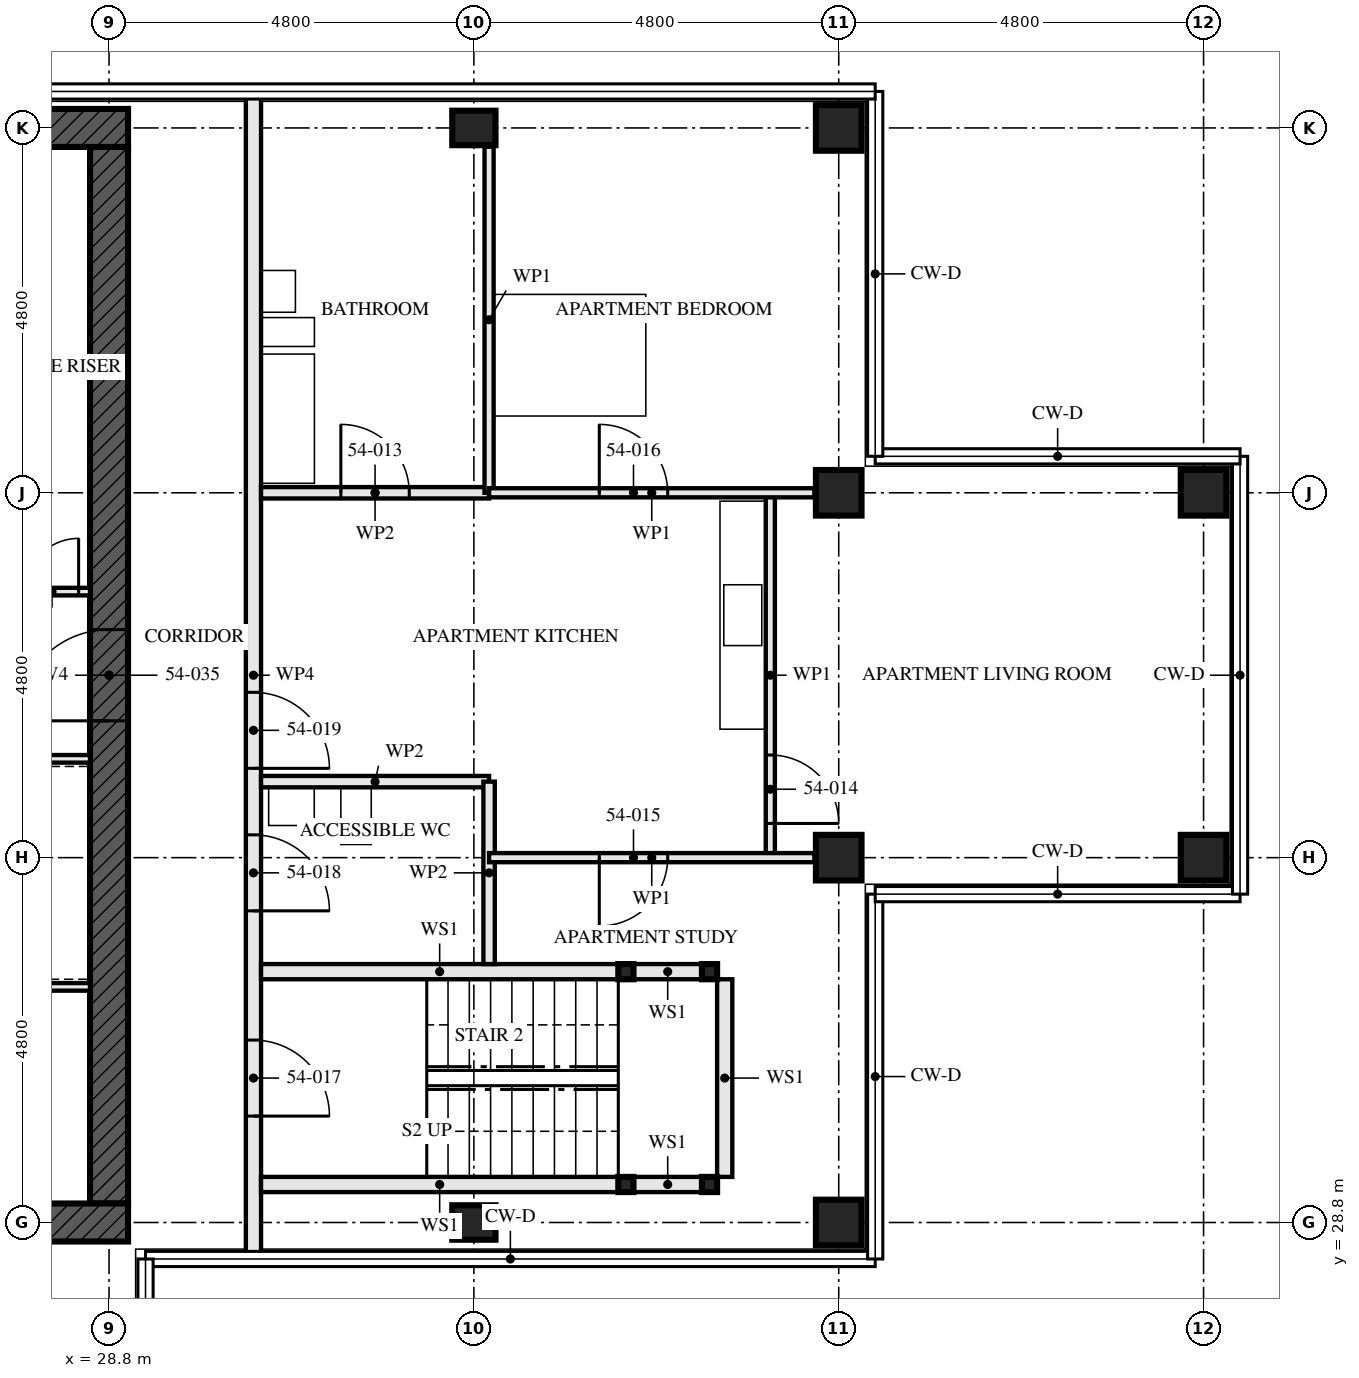
"""IFC4 building model, lengths in metres.
Left out: names, types, materials, properties, quantities, classifications, styles, units other than length and angle.
Written with IfcOpenShell. Run it as: python <this file> out.ifc"""

import sys

from ifc_helpers import new_model, si_unit, direction, frame, frame_2d, origin, origin_2d, place, context, subcontext, project, spatial, rectangle, hollow_rectangle, i_section, extrude, element, fill, save


model = new_model("IFC4")
c1 = context("Model", 3, precision=1e-05, world=origin(), true_north=direction((0.0, 1.0)))
c2 = subcontext(c1, "Body", "Model", "MODEL_VIEW")
j1 = project(units=[si_unit("LENGTHUNIT", "METRE"), si_unit("PLANEANGLEUNIT", "RADIAN")], contexts=[c1])
p1 = place(None, origin())
s1 = spatial("IfcSite", under=j1, at=p1, CompositionType="ELEMENT")
p2 = place(p1, origin())
s2 = spatial("IfcBuilding", under=s1, at=p2, CompositionType="ELEMENT")
p3 = place(p2, frame((0.0, 0.0, 198.0)))
s3 = spatial("IfcBuildingStorey", under=s2, at=p3, CompositionType="ELEMENT", Elevation=198.0)
for number, where, z_axis, x_axis in (
    (1, (33.6, 28.8, 0.0), (0.0, 0.0, 1.0), (0.0, 1.0, 0.0)),
    (2, (33.6, 43.2, 0.0), (0.0, 0.0, 1.0), (0.0, 1.0, 0.0)),
):
    element("IfcColumn", number, at=place(p3, frame(where, z_axis=z_axis, x_axis=x_axis)), inside=s3, PredefinedType="COLUMN", context=c2, shape_type="SweptSolid", body=[
        extrude(i_section(OverallWidth=0.454, OverallDepth=0.569, WebThickness=0.078, FlangeThickness=0.125, FilletRadius=0.015, at=origin_2d()), origin(), (0.0, 0.0, 1.0), 3.5),
    ])
for number, where, z_axis, x_axis in (
    (3, (38.4, 28.8, 0.0), (0.0, 0.0, 1.0), (0.0, 1.0, 0.0)),
    (4, (38.4, 33.6, 0.0), (0.0, 0.0, 1.0), (0.0, 1.0, 0.0)),
    (5, (38.4, 38.4, 0.0), (0.0, 0.0, 1.0), (0.0, 1.0, 0.0)),
    (6, (38.4, 43.2, 0.0), (0.0, 0.0, 1.0), (0.0, 1.0, 0.0)),
    (7, (43.2, 33.6, 0.0), (0.0, 0.0, 1.0), (0.0, 1.0, 0.0)),
    (8, (43.2, 38.4, 0.0), (0.0, 0.0, 1.0), (0.0, 1.0, 0.0)),
):
    element("IfcColumn", number, at=place(p3, frame(where, z_axis=z_axis, x_axis=x_axis)), inside=s3, PredefinedType="COLUMN", context=c2, shape_type="SweptSolid", body=[
        extrude(hollow_rectangle(XDim=0.6, YDim=0.6, WallThickness=0.05, at=origin_2d()), origin(), (0.0, 0.0, 1.0), 3.5),
    ])
p4 = place(p3, frame((14.15, 28.8, -0.17), z_axis=(0.0, 0.0, 1.0), x_axis=(1.0, 0.0, 0.0)))
e9 = element("IfcWall", 9, at=p4, inside=s3, PredefinedType="SHEAR", context=c2, shape_type="SweptSolid", body=[
    extrude(rectangle(XDim=14.9, YDim=0.5, at=frame_2d((7.45, 0.0))), origin(), (0.0, 0.0, 1.0), 3.5),
])
p5 = place(p4, frame((6.85, 0.0, 0.17)))
e10 = element("IfcOpeningElement", 10, at=p5, cuts=e9, PredefinedType="OPENING", context=c2, shape_type="SweptSolid", body=[
    extrude(rectangle(XDim=1.2, YDim=2.1, at=frame_2d((0.6, 1.05))), frame((0.0, 0.26, 0.0), z_axis=(0.0, -1.0, 0.0), x_axis=(1.0, 0.0, 0.0)), (0.0, 0.0, 1.0), 0.521),
])
p6 = place(p3, frame((29.05, 43.2, -0.17), z_axis=(0.0, 0.0, 1.0), x_axis=(-1.0, 0.0, 0.0)))
e11 = element("IfcWall", 11, at=p6, inside=s3, PredefinedType="SHEAR", context=c2, shape_type="SweptSolid", body=[
    extrude(rectangle(XDim=14.9, YDim=0.5, at=frame_2d((7.45, 0.0))), origin(), (0.0, 0.0, 1.0), 3.5),
])
p7 = place(p3, frame((28.8, 29.05, -0.17), z_axis=(0.0, 0.0, 1.0), x_axis=(0.0, 1.0, 0.0)))
e12 = element("IfcWall", 12, at=p7, inside=s3, PredefinedType="SHEAR", context=c2, shape_type="SweptSolid", body=[
    extrude(rectangle(XDim=13.9, YDim=0.5, at=frame_2d((6.95, 0.0))), origin(), (0.0, 0.0, 1.0), 3.5),
])
p8 = place(p7, frame((6.35, 0.0, 0.17)))
e13 = element("IfcOpeningElement", 13, at=p8, cuts=e12, PredefinedType="OPENING", context=c2, shape_type="SweptSolid", body=[
    extrude(rectangle(XDim=1.2, YDim=2.1, at=frame_2d((0.6, 1.05))), frame((0.0, 0.26, 0.0), z_axis=(0.0, -1.0, 0.0), x_axis=(1.0, 0.0, 0.0)), (0.0, 0.0, 1.0), 0.521),
])
for number, where, z_axis, x_axis in (
    (14, (36.7, 29.3, 0.0), (0.0, 0.0, 1.0), (1.0, 0.0, 0.0)),
    (15, (36.7, 32.1, 0.0), (0.0, 0.0, 1.0), (1.0, 0.0, 0.0)),
    (16, (35.6, 29.3, 0.0), (0.0, 0.0, 1.0), (1.0, 0.0, 0.0)),
    (17, (35.6, 32.1, 0.0), (0.0, 0.0, 1.0), (1.0, 0.0, 0.0)),
):
    element("IfcColumn", number, at=place(p3, frame(where, z_axis=z_axis, x_axis=x_axis)), inside=s3, PredefinedType="COLUMN", context=c2, shape_type="SweptSolid", body=[
        extrude(hollow_rectangle(XDim=0.2, YDim=0.2, WallThickness=0.008, at=origin_2d()), origin(), (0.0, 0.0, 1.0), 3.33),
    ])
p9 = place(p3, frame((36.6, 29.3, 0.0), z_axis=(0.0, 0.0, 1.0), x_axis=(-1.0, 0.0, 0.0)))
e18 = element("IfcWall", 18, at=p9, inside=s3, PredefinedType="SOLIDWALL", context=c2, shape_type="SweptSolid", body=[
    extrude(rectangle(XDim=0.9, YDim=0.2, at=frame_2d((0.45, 0.0))), origin(), (0.0, 0.0, 1.0), 2.99),
])
p10 = place(p3, frame((35.5, 29.3, 0.0), z_axis=(0.0, 0.0, 1.0), x_axis=(-1.0, 0.0, 0.0)))
e19 = element("IfcWall", 19, at=p10, inside=s3, PredefinedType="SOLIDWALL", context=c2, shape_type="SweptSolid", body=[
    extrude(rectangle(XDim=4.7, YDim=0.2, at=frame_2d((2.35, 0.0))), origin(), (0.0, 0.0, 1.0), 2.99),
])
p11 = place(p3, frame((36.6, 32.1, 0.0), z_axis=(0.0, 0.0, 1.0), x_axis=(-1.0, 0.0, 0.0)))
e20 = element("IfcWall", 20, at=p11, inside=s3, PredefinedType="SOLIDWALL", context=c2, shape_type="SweptSolid", body=[
    extrude(rectangle(XDim=0.9, YDim=0.2, at=frame_2d((0.45, 0.0))), origin(), (0.0, 0.0, 1.0), 2.99),
])
p12 = place(p3, frame((35.5, 32.1, 0.0), z_axis=(0.0, 0.0, 1.0), x_axis=(-1.0, 0.0, 0.0)))
e21 = element("IfcWall", 21, at=p12, inside=s3, PredefinedType="SOLIDWALL", context=c2, shape_type="SweptSolid", body=[
    extrude(rectangle(XDim=4.7, YDim=0.2, at=frame_2d((2.35, 0.0))), origin(), (0.0, 0.0, 1.0), 2.99),
])
p13 = place(p3, frame((36.9, 29.4, 0.0), z_axis=(0.0, 0.0, 1.0), x_axis=(0.0, 1.0, 0.0)))
e22 = element("IfcWall", 22, at=p13, inside=s3, PredefinedType="SOLIDWALL", context=c2, shape_type="SweptSolid", body=[
    extrude(rectangle(XDim=2.6, YDim=0.2, at=frame_2d((1.3, 0.0))), origin(), (0.0, 0.0, 1.0), 3.33),
])
p14 = place(p3, frame((33.8, 32.2, 0.0), z_axis=(0.0, 0.0, 1.0), x_axis=(0.0, 1.0, 0.0)))
e23 = element("IfcWall", 23, at=p14, inside=s3, PredefinedType="PARTITIONING", context=c2, shape_type="SweptSolid", body=[
    extrude(rectangle(XDim=2.4, YDim=0.15, at=frame_2d((1.2, 0.0))), origin(), (0.0, 0.0, 1.0), 2.55),
])
p15 = place(p3, frame((33.8, 34.6, 0.0), z_axis=(0.0, 0.0, 1.0), x_axis=(-1.0, 0.0, 0.0)))
e24 = element("IfcWall", 24, at=p15, inside=s3, PredefinedType="PARTITIONING", context=c2, shape_type="SweptSolid", body=[
    extrude(rectangle(XDim=3.0, YDim=0.15, at=frame_2d((1.5, 0.0))), origin(), (0.0, 0.0, 1.0), 3.33),
])
p16 = place(p3, frame((33.8, 38.4, 0.0), z_axis=(0.0, 0.0, 1.0), x_axis=(-1.0, 0.0, 0.0)))
e25 = element("IfcWall", 25, at=p16, inside=s3, PredefinedType="PARTITIONING", context=c2, shape_type="SweptSolid", body=[
    extrude(rectangle(XDim=3.0, YDim=0.15, at=frame_2d((1.5, 0.0))), origin(), (0.0, 0.0, 1.0), 2.55),
])
p17 = place(p16, frame((1.05, 0.0, 0.0)))
e26 = element("IfcOpeningElement", 26, at=p17, cuts=e25, PredefinedType="OPENING", context=c2, shape_type="SweptSolid", body=[
    extrude(rectangle(XDim=0.9, YDim=2.1, at=frame_2d((0.45, 1.05))), frame((0.0, 0.085, 0.0), z_axis=(0.0, -1.0, 0.0), x_axis=(1.0, 0.0, 0.0)), (0.0, 0.0, 1.0), 0.171),
])
p18 = place(p3, frame((37.5, 33.6, 0.0), z_axis=(0.0, 0.0, 1.0), x_axis=(0.0, 1.0, 0.0)))
e27 = element("IfcWall", 27, at=p18, inside=s3, PredefinedType="PARTITIONING", context=c2, shape_type="SweptSolid", body=[
    extrude(rectangle(XDim=4.8, YDim=0.12, at=frame_2d((2.4, 0.0))), origin(), (0.0, 0.0, 1.0), 3.33),
])
p19 = place(p18, frame((0.45, 0.0, 0.0)))
e28 = element("IfcOpeningElement", 28, at=p19, cuts=e27, PredefinedType="OPENING", context=c2, shape_type="SweptSolid", body=[
    extrude(rectangle(XDim=0.9, YDim=2.1, at=frame_2d((0.45, 1.05))), frame((0.0, 0.071, 0.0), z_axis=(0.0, -1.0, 0.0), x_axis=(1.0, 0.0, 0.0)), (0.0, 0.0, 1.0), 0.141),
])
p20 = place(p3, frame((33.8, 38.4, 0.0), z_axis=(0.0, 0.0, 1.0), x_axis=(0.0, 1.0, 0.0)))
e29 = element("IfcWall", 29, at=p20, inside=s3, PredefinedType="PARTITIONING", context=c2, shape_type="SweptSolid", body=[
    extrude(rectangle(XDim=4.553, YDim=0.12, at=frame_2d((2.276, 0.0))), origin(), (0.0, 0.0, 1.0), 3.33),
])
p21 = place(p3, frame((38.08, 33.6, 0.0), z_axis=(0.0, 0.0, 1.0), x_axis=(-1.0, 0.0, 0.0)))
e30 = element("IfcWall", 30, at=p21, inside=s3, PredefinedType="PARTITIONING", context=c2, shape_type="SweptSolid", body=[
    extrude(rectangle(XDim=4.28, YDim=0.12, at=frame_2d((2.14, 0.0))), origin(), (0.0, 0.0, 1.0), 2.55),
])
p22 = place(p21, frame((1.93, 0.0, 0.0)))
e31 = element("IfcOpeningElement", 31, at=p22, cuts=e30, PredefinedType="OPENING", context=c2, shape_type="SweptSolid", body=[
    extrude(rectangle(XDim=0.9, YDim=2.1, at=frame_2d((0.45, 1.05))), frame((0.0, 0.071, 0.0), z_axis=(0.0, -1.0, 0.0), x_axis=(1.0, 0.0, 0.0)), (0.0, 0.0, 1.0), 0.141),
])
p23 = place(p3, frame((38.08, 38.4, 0.0), z_axis=(0.0, 0.0, 1.0), x_axis=(-1.0, 0.0, 0.0)))
e32 = element("IfcWall", 32, at=p23, inside=s3, PredefinedType="PARTITIONING", context=c2, shape_type="SweptSolid", body=[
    extrude(rectangle(XDim=4.28, YDim=0.12, at=frame_2d((2.14, 0.0))), origin(), (0.0, 0.0, 1.0), 2.55),
])
p24 = place(p23, frame((1.93, 0.0, 0.0)))
e33 = element("IfcOpeningElement", 33, at=p24, cuts=e32, PredefinedType="OPENING", context=c2, shape_type="SweptSolid", body=[
    extrude(rectangle(XDim=0.9, YDim=2.1, at=frame_2d((0.45, 1.05))), frame((0.0, 0.071, 0.0), z_axis=(0.0, -1.0, 0.0), x_axis=(1.0, 0.0, 0.0)), (0.0, 0.0, 1.0), 0.141),
])
p25 = place(p3, frame((30.7, 28.345, 0.0), z_axis=(0.0, 0.0, 1.0), x_axis=(0.0, 1.0, 0.0)))
e34 = element("IfcWall", 34, at=p25, inside=s3, PredefinedType="PARTITIONING", context=c2, shape_type="SweptSolid", body=[
    extrude(rectangle(XDim=15.31, YDim=0.2, at=frame_2d((7.655, 0.0))), origin(), (0.0, 0.0, 1.0), 2.32),
])
p26 = place(p25, frame((1.855, 0.0, 0.0)))
e35 = element("IfcOpeningElement", 35, at=p26, cuts=e34, PredefinedType="OPENING", context=c2, shape_type="SweptSolid", body=[
    extrude(rectangle(XDim=1.0, YDim=2.1, at=frame_2d((0.5, 1.05))), frame((0.0, 0.111, 0.0), z_axis=(0.0, -1.0, 0.0), x_axis=(1.0, 0.0, 0.0)), (0.0, 0.0, 1.0), 0.221),
])
p27 = place(p25, frame((4.555, 0.0, 0.0)))
e36 = element("IfcOpeningElement", 36, at=p27, cuts=e34, PredefinedType="OPENING", context=c2, shape_type="SweptSolid", body=[
    extrude(rectangle(XDim=1.0, YDim=2.1, at=frame_2d((0.5, 1.05))), frame((0.0, 0.111, 0.0), z_axis=(0.0, -1.0, 0.0), x_axis=(1.0, 0.0, 0.0)), (0.0, 0.0, 1.0), 0.221),
])
p28 = place(p25, frame((6.43, 0.0, 0.0)))
e37 = element("IfcOpeningElement", 37, at=p28, cuts=e34, PredefinedType="OPENING", context=c2, shape_type="SweptSolid", body=[
    extrude(rectangle(XDim=1.0, YDim=2.1, at=frame_2d((0.5, 1.05))), frame((0.0, 0.111, 0.0), z_axis=(0.0, -1.0, 0.0), x_axis=(1.0, 0.0, 0.0)), (0.0, 0.0, 1.0), 0.221),
])
p29 = place(p3, frame((23.05, 34.9, 0.0), z_axis=(0.0, 0.0, 1.0), x_axis=(1.0, 0.0, 0.0)))
e38 = element("IfcWall", 38, at=p29, inside=s3, PredefinedType="SOLIDWALL", context=c2, shape_type="SweptSolid", body=[
    extrude(rectangle(XDim=5.5, YDim=0.1, at=frame_2d((2.75, 0.0))), origin(), (0.0, 0.0, 1.0), 3.33),
])
p30 = place(p29, frame((0.85, 0.0, 0.0)))
e39 = element("IfcOpeningElement", 39, at=p30, cuts=e38, PredefinedType="OPENING", context=c2, shape_type="SweptSolid", body=[
    extrude(rectangle(XDim=1.0, YDim=2.1, at=frame_2d((0.5, 1.05))), frame((0.0, 0.061, 0.0), z_axis=(0.0, -1.0, 0.0), x_axis=(1.0, 0.0, 0.0)), (0.0, 0.0, 1.0), 0.121),
])
p31 = place(p29, frame((3.625, 0.0, 0.0)))
e40 = element("IfcOpeningElement", 40, at=p31, cuts=e38, PredefinedType="OPENING", context=c2, shape_type="SweptSolid", body=[
    extrude(rectangle(XDim=1.0, YDim=2.1, at=frame_2d((0.5, 1.05))), frame((0.0, 0.061, 0.0), z_axis=(0.0, -1.0, 0.0), x_axis=(1.0, 0.0, 0.0)), (0.0, 0.0, 1.0), 0.121),
])
p32 = place(p3, frame((22.65, 37.1, 0.0), z_axis=(0.0, 0.0, 1.0), x_axis=(1.0, 0.0, 0.0)))
e41 = element("IfcWall", 41, at=p32, inside=s3, PredefinedType="SOLIDWALL", context=c2, shape_type="SweptSolid", body=[
    extrude(rectangle(XDim=5.9, YDim=0.1, at=frame_2d((2.95, 0.0))), origin(), (0.0, 0.0, 1.0), 3.33),
])
p33 = place(p32, frame((3.5, 0.0, 0.0)))
e42 = element("IfcOpeningElement", 42, at=p33, cuts=e41, PredefinedType="OPENING", context=c2, shape_type="SweptSolid", body=[
    extrude(rectangle(XDim=0.9, YDim=2.1, at=frame_2d((0.45, 1.05))), frame((0.0, 0.061, 0.0), z_axis=(0.0, -1.0, 0.0), x_axis=(1.0, 0.0, 0.0)), (0.0, 0.0, 1.0), 0.121),
])
p34 = place(p32, frame((5.05, 0.0, 0.0)))
e43 = element("IfcOpeningElement", 43, at=p34, cuts=e41, PredefinedType="OPENING", context=c2, shape_type="SweptSolid", body=[
    extrude(rectangle(XDim=0.7, YDim=2.1, at=frame_2d((0.35, 1.05))), frame((0.0, 0.061, 0.0), z_axis=(0.0, -1.0, 0.0), x_axis=(1.0, 0.0, 0.0)), (0.0, 0.0, 1.0), 0.121),
])
p35 = place(p3, frame((23.15, 31.9, 0.0), z_axis=(0.0, 0.0, 1.0), x_axis=(1.0, 0.0, 0.0)))
e44 = element("IfcWall", 44, at=p35, inside=s3, PredefinedType="SOLIDWALL", context=c2, shape_type="SweptSolid", body=[
    extrude(rectangle(XDim=5.4, YDim=0.1, at=frame_2d((2.7, 0.0))), origin(), (0.0, 0.0, 1.0), 3.33),
])
p36 = place(p17, frame((0.9, 0.0, 0.0), z_axis=(0.0, 0.0, 1.0), x_axis=(-1.0, 0.0, 0.0)))
e45 = element("IfcDoor", 45, at=p36, inside=s3, OperationType="SINGLE_SWING_RIGHT", PredefinedType="DOOR", context=c2, shape_type="SweptSolid", body=[
    extrude(rectangle(XDim=0.9, YDim=2.1, at=frame_2d((0.45, 1.05))), frame((0.0, 0.022, 0.0), z_axis=(0.0, -1.0, 0.0), x_axis=(1.0, 0.0, 0.0)), (0.0, 0.0, 1.0), 0.044),
])
fill(e26, e45)
p37 = place(p19, frame((0.9, 0.0, 0.0), z_axis=(0.0, 0.0, 1.0), x_axis=(-1.0, 0.0, 0.0)))
e46 = element("IfcDoor", 46, at=p37, inside=s3, OperationType="SINGLE_SWING_LEFT", PredefinedType="DOOR", context=c2, shape_type="SweptSolid", body=[
    extrude(rectangle(XDim=0.9, YDim=2.1, at=frame_2d((0.45, 1.05))), frame((0.0, 0.022, 0.0), z_axis=(0.0, -1.0, 0.0), x_axis=(1.0, 0.0, 0.0)), (0.0, 0.0, 1.0), 0.044),
])
fill(e28, e46)
p38 = place(p22, origin())
e47 = element("IfcDoor", 47, at=p38, inside=s3, OperationType="SINGLE_SWING_LEFT", PredefinedType="DOOR", context=c2, shape_type="SweptSolid", body=[
    extrude(rectangle(XDim=0.9, YDim=2.1, at=frame_2d((0.45, 1.05))), frame((0.0, 0.022, 0.0), z_axis=(0.0, -1.0, 0.0), x_axis=(1.0, 0.0, 0.0)), (0.0, 0.0, 1.0), 0.044),
])
fill(e31, e47)
p39 = place(p24, frame((0.9, 0.0, 0.0), z_axis=(0.0, 0.0, 1.0), x_axis=(-1.0, 0.0, 0.0)))
e48 = element("IfcDoor", 48, at=p39, inside=s3, OperationType="SINGLE_SWING_RIGHT", PredefinedType="DOOR", context=c2, shape_type="SweptSolid", body=[
    extrude(rectangle(XDim=0.9, YDim=2.1, at=frame_2d((0.45, 1.05))), frame((0.0, 0.022, 0.0), z_axis=(0.0, -1.0, 0.0), x_axis=(1.0, 0.0, 0.0)), (0.0, 0.0, 1.0), 0.044),
])
fill(e33, e48)
p40 = place(p26, frame((1.0, 0.0, 0.0), z_axis=(0.0, 0.0, 1.0), x_axis=(-1.0, 0.0, 0.0)))
e49 = element("IfcDoor", 49, at=p40, inside=s3, OperationType="SINGLE_SWING_LEFT", PredefinedType="DOOR", context=c2, shape_type="SweptSolid", body=[
    extrude(rectangle(XDim=1.0, YDim=2.1, at=frame_2d((0.5, 1.05))), frame((0.0, 0.032, 0.0), z_axis=(0.0, -1.0, 0.0), x_axis=(1.0, 0.0, 0.0)), (0.0, 0.0, 1.0), 0.064),
])
fill(e35, e49)
p41 = place(p27, frame((1.0, 0.0, 0.0), z_axis=(0.0, 0.0, 1.0), x_axis=(-1.0, 0.0, 0.0)))
e50 = element("IfcDoor", 50, at=p41, inside=s3, OperationType="SINGLE_SWING_LEFT", PredefinedType="DOOR", context=c2, shape_type="SweptSolid", body=[
    extrude(rectangle(XDim=1.0, YDim=2.1, at=frame_2d((0.5, 1.05))), frame((0.0, 0.027, 0.0), z_axis=(0.0, -1.0, 0.0), x_axis=(1.0, 0.0, 0.0)), (0.0, 0.0, 1.0), 0.054),
])
fill(e36, e50)
p42 = place(p28, frame((1.0, 0.0, 0.0), z_axis=(0.0, 0.0, 1.0), x_axis=(-1.0, 0.0, 0.0)))
e51 = element("IfcDoor", 51, at=p42, inside=s3, OperationType="SINGLE_SWING_LEFT", PredefinedType="DOOR", context=c2, shape_type="SweptSolid", body=[
    extrude(rectangle(XDim=1.0, YDim=2.1, at=frame_2d((0.5, 1.05))), frame((0.0, 0.027, 0.0), z_axis=(0.0, -1.0, 0.0), x_axis=(1.0, 0.0, 0.0)), (0.0, 0.0, 1.0), 0.054),
])
fill(e37, e51)
p43 = place(p34, origin())
e52 = element("IfcDoor", 52, at=p43, inside=s3, OperationType="SINGLE_SWING_LEFT", PredefinedType="DOOR", context=c2, shape_type="SweptSolid", body=[
    extrude(rectangle(XDim=0.7, YDim=2.1, at=frame_2d((0.35, 1.05))), frame((0.0, 0.027, 0.0), z_axis=(0.0, -1.0, 0.0), x_axis=(1.0, 0.0, 0.0)), (0.0, 0.0, 1.0), 0.054),
])
fill(e43, e52)
p44 = place(p8, origin())
e53 = element("IfcDoor", 53, at=p44, inside=s3, OperationType="SINGLE_SWING_LEFT", PredefinedType="DOOR", context=c2, shape_type="SweptSolid", body=[
    extrude(rectangle(XDim=1.2, YDim=2.1, at=frame_2d((0.6, 1.05))), frame((0.0, 0.027, 0.0), z_axis=(0.0, -1.0, 0.0), x_axis=(1.0, 0.0, 0.0)), (0.0, 0.0, 1.0), 0.054),
])
fill(e13, e53)
save(model, sys.argv[1])
